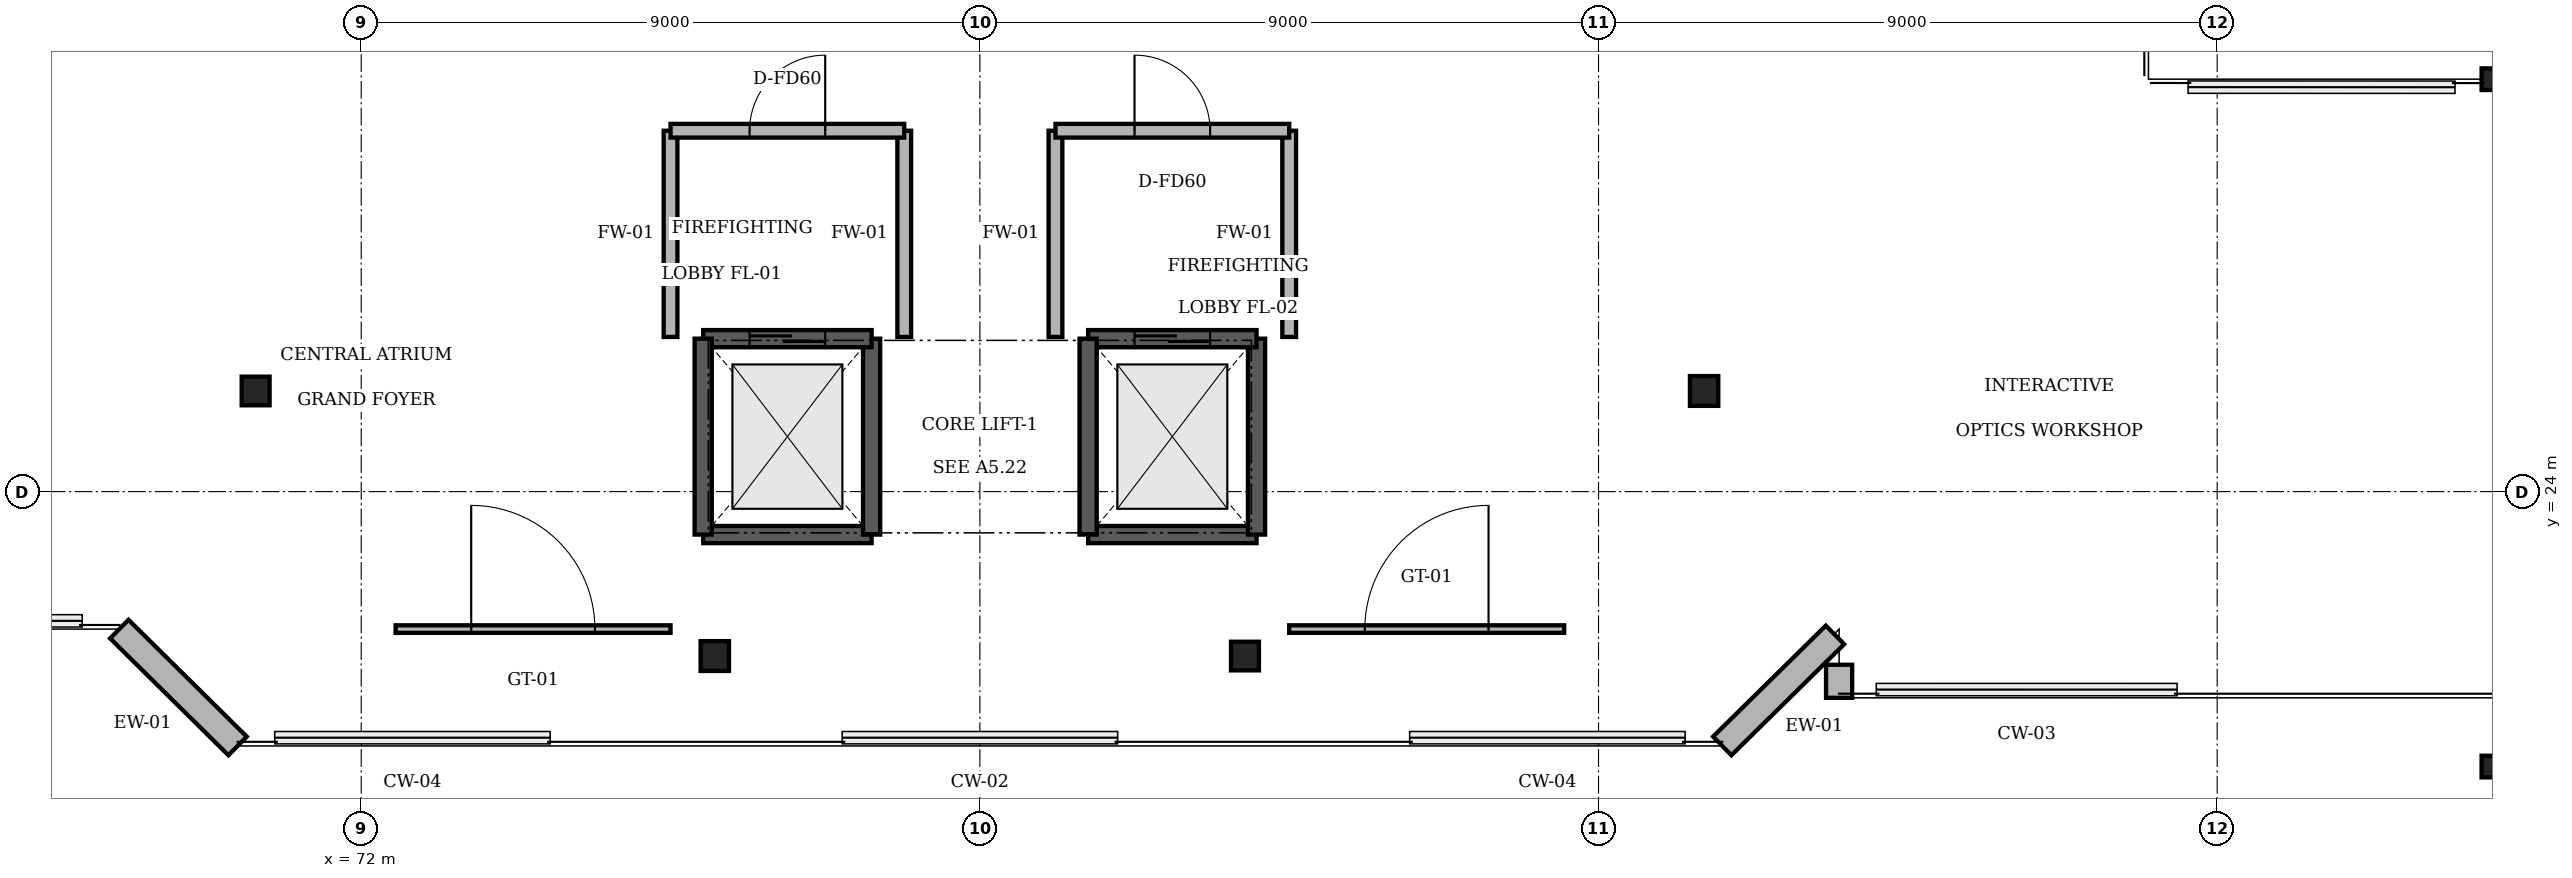
"""IFC4 building model, lengths in metres.
Left out: names, types, materials, properties, quantities, classifications, styles, units other than length and angle.
Written with IfcOpenShell. Run it as: python <this file> out.ifc"""

import sys

from ifc_helpers import new_model, si_unit, direction, frame, frame_2d, origin, origin_2d, place, context, subcontext, project, spatial, rectangle, i_section, extrude, element, fill, save


model = new_model("IFC4")
c1 = context("Model", 3, precision=1e-05, world=origin(), true_north=direction((0.0, 1.0)))
c2 = subcontext(c1, "Body", "Model", "MODEL_VIEW")
j1 = project(units=[si_unit("LENGTHUNIT", "METRE"), si_unit("PLANEANGLEUNIT", "RADIAN")], contexts=[c1])
p1 = place(None, origin())
s1 = spatial("IfcSite", under=j1, at=p1, CompositionType="ELEMENT")
p2 = place(p1, origin())
s2 = spatial("IfcBuilding", under=s1, at=p2, CompositionType="ELEMENT")
p3 = place(p2, origin())
s3 = spatial("IfcBuildingStorey", under=s2, at=p3, CompositionType="ELEMENT", Elevation=0.0)
p4 = place(p3, frame((70.464, 25.464, 0.0), z_axis=(0.0, 0.0, 1.0), x_axis=(1.0, 0.0, 0.0)))
e1 = element("IfcColumn", 1, at=p4, inside=s3, PredefinedType="COLUMN", context=c2, shape_type="SweptSolid", body=[
    extrude(i_section(OverallWidth=0.406, OverallDepth=0.417, WebThickness=0.03, FlangeThickness=0.044, FilletRadius=0.015, at=origin_2d()), origin(), (0.0, 0.0, 1.0), 5.4),
])
p5 = place(p3, frame((77.144, 21.608, 0.0), z_axis=(0.0, 0.0, 1.0), x_axis=(1.0, 0.0, 0.0)))
e2 = element("IfcColumn", 2, at=p5, inside=s3, PredefinedType="COLUMN", context=c2, shape_type="SweptSolid", body=[
    extrude(i_section(OverallWidth=0.412, OverallDepth=0.434, WebThickness=0.036, FlangeThickness=0.044, FilletRadius=0.015, at=origin_2d()), origin(), (0.0, 0.0, 1.0), 5.4),
])
p6 = place(p3, frame((84.856, 21.608, 0.0), z_axis=(0.0, 0.0, 1.0), x_axis=(1.0, 0.0, 0.0)))
e3 = element("IfcColumn", 3, at=p6, inside=s3, PredefinedType="COLUMN", context=c2, shape_type="SweptSolid", body=[
    extrude(i_section(OverallWidth=0.406, OverallDepth=0.417, WebThickness=0.03, FlangeThickness=0.044, FilletRadius=0.015, at=origin_2d()), origin(), (0.0, 0.0, 1.0), 5.4),
])
p7 = place(p3, frame((91.536, 25.464, 0.0), z_axis=(0.0, 0.0, 1.0), x_axis=(1.0, 0.0, 0.0)))
e4 = element("IfcColumn", 4, at=p7, inside=s3, PredefinedType="COLUMN", context=c2, shape_type="SweptSolid", body=[
    extrude(i_section(OverallWidth=0.412, OverallDepth=0.434, WebThickness=0.036, FlangeThickness=0.044, FilletRadius=0.015, at=origin_2d()), origin(), (0.0, 0.0, 1.0), 5.4),
])
for number, where, z_axis, x_axis in (
    (5, (103.0, 20.0, 0.0), (0.0, 0.0, 1.0), (1.0, 0.0, 0.0)),
    (6, (103.0, 30.0, 0.0), (0.0, 0.0, 1.0), (1.0, 0.0, 0.0)),
):
    element("IfcColumn", number, at=place(p3, frame(where, z_axis=z_axis, x_axis=x_axis)), inside=s3, PredefinedType="COLUMN", context=c2, shape_type="SweptSolid", body=[
        extrude(i_section(OverallWidth=0.307, OverallDepth=0.315, WebThickness=0.012, FlangeThickness=0.019, FilletRadius=0.013, at=origin_2d()), origin(), (0.0, 0.0, 1.0), 5.4),
    ])
p8 = place(p3, frame((93.5, 21.0, 0.0), z_axis=(0.0, 0.0, 1.0), x_axis=(0.0, 1.0, 0.0)))
e7 = element("IfcWall", 7, at=p8, inside=s3, PredefinedType="SOLIDWALL", context=c2, shape_type="SweptSolid", body=[
    extrude(rectangle(XDim=0.481, YDim=0.38, at=frame_2d((0.24, 0.0))), origin(), (0.0, 0.0, 1.0), 4.7),
])
p9 = place(p3, frame((93.44, 21.915, 0.0), z_axis=(0.0, 0.0, 1.0), x_axis=(-0.712495836669, -0.701676337586, 0.0)))
e8 = element("IfcWall", 8, at=p9, inside=s3, PredefinedType="SOLIDWALL", context=c2, shape_type="SweptSolid", body=[
    extrude(rectangle(XDim=2.302, YDim=0.38, at=frame_2d((1.151, 0.0))), origin(), (0.0, 0.0, 1.0), 4.7),
])
p10 = place(p3, frame((70.201, 20.3, 0.0), z_axis=(0.0, 0.0, 1.0), x_axis=(-0.711384076748, 0.702803454281, 0.0)))
e9 = element("IfcWall", 9, at=p10, inside=s3, PredefinedType="SOLIDWALL", context=c2, shape_type="SweptSolid", body=[
    extrude(rectangle(XDim=2.418, YDim=0.38, at=frame_2d((1.209, 0.0))), origin(), (0.0, 0.0, 1.0), 4.7),
])
p11 = place(p3, frame((76.975, 23.375, 0.0), z_axis=(0.0, 0.0, 1.0), x_axis=(1.0, 0.0, 0.0)))
e10 = element("IfcWall", 10, at=p11, inside=s3, PredefinedType="SOLIDWALL", context=c2, shape_type="SweptSolid", body=[
    extrude(rectangle(XDim=2.45, YDim=0.25, at=frame_2d((1.225, 0.0))), origin(), (0.0, 0.0, 1.0), 5.4),
])
p12 = place(p3, frame((79.425, 23.375, 0.0), z_axis=(0.0, 0.0, 1.0), x_axis=(0.0, 1.0, 0.0)))
e11 = element("IfcWall", 11, at=p12, inside=s3, PredefinedType="SOLIDWALL", context=c2, shape_type="SweptSolid", body=[
    extrude(rectangle(XDim=2.85, YDim=0.25, at=frame_2d((1.425, 0.0))), origin(), (0.0, 0.0, 1.0), 5.4),
])
p13 = place(p3, frame((79.425, 26.225, 0.0), z_axis=(0.0, 0.0, 1.0), x_axis=(-1.0, 0.0, 0.0)))
e12 = element("IfcWall", 12, at=p13, inside=s3, PredefinedType="SOLIDWALL", context=c2, shape_type="SweptSolid", body=[
    extrude(rectangle(XDim=2.45, YDim=0.25, at=frame_2d((1.225, 0.0))), origin(), (0.0, 0.0, 1.0), 5.4),
])
p14 = place(p13, frame((0.675, 0.0, 0.0)))
e13 = element("IfcOpeningElement", 13, at=p14, cuts=e12, PredefinedType="OPENING", context=c2, shape_type="SweptSolid", body=[
    extrude(rectangle(XDim=1.1, YDim=2.2, at=frame_2d((0.55, 1.1))), frame((0.0, 0.135, 0.0), z_axis=(0.0, -1.0, 0.0), x_axis=(1.0, 0.0, 0.0)), (0.0, 0.0, 1.0), 0.27),
])
p15 = place(p3, frame((76.975, 26.225, 0.0), z_axis=(0.0, 0.0, 1.0), x_axis=(0.0, -1.0, 0.0)))
e14 = element("IfcWall", 14, at=p15, inside=s3, PredefinedType="SOLIDWALL", context=c2, shape_type="SweptSolid", body=[
    extrude(rectangle(XDim=2.85, YDim=0.25, at=frame_2d((1.425, 0.0))), origin(), (0.0, 0.0, 1.0), 5.4),
])
p16 = place(p3, frame((76.5, 26.25, 0.0), z_axis=(0.0, 0.0, 1.0), x_axis=(0.0, 1.0, 0.0)))
e15 = element("IfcWall", 15, at=p16, inside=s3, PredefinedType="SOLIDWALL", context=c2, shape_type="SweptSolid", body=[
    extrude(rectangle(XDim=3.0, YDim=0.2, at=frame_2d((1.5, 0.0))), origin(), (0.0, 0.0, 1.0), 4.204),
])
p17 = place(p3, frame((79.9, 26.25, 0.0), z_axis=(0.0, 0.0, 1.0), x_axis=(0.0, 1.0, 0.0)))
e16 = element("IfcWall", 16, at=p17, inside=s3, PredefinedType="SOLIDWALL", context=c2, shape_type="SweptSolid", body=[
    extrude(rectangle(XDim=3.0, YDim=0.2, at=frame_2d((1.5, 0.0))), origin(), (0.0, 0.0, 1.0), 4.57),
])
p18 = place(p3, frame((76.5, 29.25, 0.0), z_axis=(0.0, 0.0, 1.0), x_axis=(1.0, 0.0, 0.0)))
e17 = element("IfcWall", 17, at=p18, inside=s3, PredefinedType="SOLIDWALL", context=c2, shape_type="SweptSolid", body=[
    extrude(rectangle(XDim=3.4, YDim=0.2, at=frame_2d((1.7, 0.0))), origin(), (0.0, 0.0, 1.0), 4.204),
])
p19 = place(p18, frame((1.15, 0.0, 0.0)))
e18 = element("IfcOpeningElement", 18, at=p19, cuts=e17, PredefinedType="OPENING", context=c2, shape_type="SweptSolid", body=[
    extrude(rectangle(XDim=1.1, YDim=2.2, at=frame_2d((0.55, 1.1))), frame((0.0, 0.11, 0.0), z_axis=(0.0, -1.0, 0.0), x_axis=(1.0, 0.0, 0.0)), (0.0, 0.0, 1.0), 0.22),
])
p20 = place(p3, frame((82.575, 23.375, 0.0), z_axis=(0.0, 0.0, 1.0), x_axis=(1.0, 0.0, 0.0)))
e19 = element("IfcWall", 19, at=p20, inside=s3, PredefinedType="SOLIDWALL", context=c2, shape_type="SweptSolid", body=[
    extrude(rectangle(XDim=2.45, YDim=0.25, at=frame_2d((1.225, 0.0))), origin(), (0.0, 0.0, 1.0), 5.4),
])
p21 = place(p3, frame((85.025, 23.375, 0.0), z_axis=(0.0, 0.0, 1.0), x_axis=(0.0, 1.0, 0.0)))
e20 = element("IfcWall", 20, at=p21, inside=s3, PredefinedType="SOLIDWALL", context=c2, shape_type="SweptSolid", body=[
    extrude(rectangle(XDim=2.85, YDim=0.25, at=frame_2d((1.425, 0.0))), origin(), (0.0, 0.0, 1.0), 5.4),
])
p22 = place(p3, frame((85.025, 26.225, 0.0), z_axis=(0.0, 0.0, 1.0), x_axis=(-1.0, 0.0, 0.0)))
e21 = element("IfcWall", 21, at=p22, inside=s3, PredefinedType="SOLIDWALL", context=c2, shape_type="SweptSolid", body=[
    extrude(rectangle(XDim=2.45, YDim=0.25, at=frame_2d((1.225, 0.0))), origin(), (0.0, 0.0, 1.0), 5.4),
])
p23 = place(p22, frame((0.675, 0.0, 0.0)))
e22 = element("IfcOpeningElement", 22, at=p23, cuts=e21, PredefinedType="OPENING", context=c2, shape_type="SweptSolid", body=[
    extrude(rectangle(XDim=1.1, YDim=2.2, at=frame_2d((0.55, 1.1))), frame((0.0, 0.135, 0.0), z_axis=(0.0, -1.0, 0.0), x_axis=(1.0, 0.0, 0.0)), (0.0, 0.0, 1.0), 0.27),
])
p24 = place(p3, frame((82.575, 26.225, 0.0), z_axis=(0.0, 0.0, 1.0), x_axis=(0.0, -1.0, 0.0)))
e23 = element("IfcWall", 23, at=p24, inside=s3, PredefinedType="SOLIDWALL", context=c2, shape_type="SweptSolid", body=[
    extrude(rectangle(XDim=2.85, YDim=0.25, at=frame_2d((1.425, 0.0))), origin(), (0.0, 0.0, 1.0), 5.4),
])
p25 = place(p3, frame((82.1, 26.25, 0.0), z_axis=(0.0, 0.0, 1.0), x_axis=(0.0, 1.0, 0.0)))
e24 = element("IfcWall", 24, at=p25, inside=s3, PredefinedType="SOLIDWALL", context=c2, shape_type="SweptSolid", body=[
    extrude(rectangle(XDim=3.0, YDim=0.2, at=frame_2d((1.5, 0.0))), origin(), (0.0, 0.0, 1.0), 4.57),
])
p26 = place(p3, frame((85.5, 26.25, 0.0), z_axis=(0.0, 0.0, 1.0), x_axis=(0.0, 1.0, 0.0)))
e25 = element("IfcWall", 25, at=p26, inside=s3, PredefinedType="SOLIDWALL", context=c2, shape_type="SweptSolid", body=[
    extrude(rectangle(XDim=3.0, YDim=0.2, at=frame_2d((1.5, 0.0))), origin(), (0.0, 0.0, 1.0), 4.206),
])
p27 = place(p3, frame((82.1, 29.25, 0.0), z_axis=(0.0, 0.0, 1.0), x_axis=(1.0, 0.0, 0.0)))
e26 = element("IfcWall", 26, at=p27, inside=s3, PredefinedType="SOLIDWALL", context=c2, shape_type="SweptSolid", body=[
    extrude(rectangle(XDim=3.4, YDim=0.2, at=frame_2d((1.7, 0.0))), origin(), (0.0, 0.0, 1.0), 4.206),
])
p28 = place(p27, frame((1.15, 0.0, 0.0)))
e27 = element("IfcOpeningElement", 27, at=p28, cuts=e26, PredefinedType="OPENING", context=c2, shape_type="SweptSolid", body=[
    extrude(rectangle(XDim=1.1, YDim=2.2, at=frame_2d((0.55, 1.1))), frame((0.0, 0.11, 0.0), z_axis=(0.0, -1.0, 0.0), x_axis=(1.0, 0.0, 0.0)), (0.0, 0.0, 1.0), 0.22),
])
p29 = place(p3, frame((72.5, 22.0, 0.0), z_axis=(0.0, 0.0, 1.0), x_axis=(1.0, 0.0, 0.0)))
e28 = element("IfcWall", 28, at=p29, inside=s3, PredefinedType="PARTITIONING", context=c2, shape_type="SweptSolid", body=[
    extrude(rectangle(XDim=4.0, YDim=0.11, at=frame_2d((2.0, 0.0))), origin(), (0.0, 0.0, 1.0), 2.55),
])
p30 = place(p29, frame((1.1, 0.0, 0.0)))
e29 = element("IfcOpeningElement", 29, at=p30, cuts=e28, PredefinedType="OPENING", context=c2, shape_type="SweptSolid", body=[
    extrude(rectangle(XDim=1.8, YDim=2.1, at=frame_2d((0.9, 1.05))), frame((0.0, 0.065, 0.0), z_axis=(0.0, -1.0, 0.0), x_axis=(1.0, 0.0, 0.0)), (0.0, 0.0, 1.0), 0.13),
])
p31 = place(p3, frame((85.5, 22.0, 0.0), z_axis=(0.0, 0.0, 1.0), x_axis=(1.0, 0.0, 0.0)))
e30 = element("IfcWall", 30, at=p31, inside=s3, PredefinedType="PARTITIONING", context=c2, shape_type="SweptSolid", body=[
    extrude(rectangle(XDim=4.0, YDim=0.11, at=frame_2d((2.0, 0.0))), origin(), (0.0, 0.0, 1.0), 2.55),
])
p32 = place(p31, frame((1.1, 0.0, 0.0)))
e31 = element("IfcOpeningElement", 31, at=p32, cuts=e30, PredefinedType="OPENING", context=c2, shape_type="SweptSolid", body=[
    extrude(rectangle(XDim=1.8, YDim=2.1, at=frame_2d((0.9, 1.05))), frame((0.0, 0.065, 0.0), z_axis=(0.0, -1.0, 0.0), x_axis=(1.0, 0.0, 0.0)), (0.0, 0.0, 1.0), 0.13),
])
p33 = place(p14, origin())
e32 = element("IfcDoor", 32, at=p33, inside=s3, OperationType="SLIDING_TO_LEFT", PredefinedType="DOOR", context=c2, shape_type="SweptSolid", body=[
    extrude(rectangle(XDim=1.1, YDim=2.2, at=frame_2d((0.55, 1.1))), frame((0.0, 0.025, 0.0), z_axis=(0.0, -1.0, 0.0), x_axis=(1.0, 0.0, 0.0)), (0.0, 0.0, 1.0), 0.05),
])
fill(e13, e32)
p34 = place(p19, origin())
e33 = element("IfcDoor", 33, at=p34, inside=s3, OperationType="SINGLE_SWING_RIGHT", PredefinedType="DOOR", context=c2, shape_type="SweptSolid", body=[
    extrude(rectangle(XDim=1.1, YDim=2.2, at=frame_2d((0.55, 1.1))), frame((0.0, 0.025, 0.0), z_axis=(0.0, -1.0, 0.0), x_axis=(1.0, 0.0, 0.0)), (0.0, 0.0, 1.0), 0.05),
])
fill(e18, e33)
p35 = place(p23, origin())
e34 = element("IfcDoor", 34, at=p35, inside=s3, OperationType="SLIDING_TO_LEFT", PredefinedType="DOOR", context=c2, shape_type="SweptSolid", body=[
    extrude(rectangle(XDim=1.1, YDim=2.2, at=frame_2d((0.55, 1.1))), frame((0.0, 0.025, 0.0), z_axis=(0.0, -1.0, 0.0), x_axis=(1.0, 0.0, 0.0)), (0.0, 0.0, 1.0), 0.05),
])
fill(e22, e34)
p36 = place(p28, origin())
e35 = element("IfcDoor", 35, at=p36, inside=s3, OperationType="SINGLE_SWING_LEFT", PredefinedType="DOOR", context=c2, shape_type="SweptSolid", body=[
    extrude(rectangle(XDim=1.1, YDim=2.2, at=frame_2d((0.55, 1.1))), frame((0.0, 0.025, 0.0), z_axis=(0.0, -1.0, 0.0), x_axis=(1.0, 0.0, 0.0)), (0.0, 0.0, 1.0), 0.05),
])
fill(e27, e35)
p37 = place(p30, origin())
e36 = element("IfcDoor", 36, at=p37, inside=s3, OperationType="SINGLE_SWING_LEFT", PredefinedType="GATE", context=c2, shape_type="SweptSolid", body=[
    extrude(rectangle(XDim=1.8, YDim=2.1, at=frame_2d((0.9, 1.05))), frame((0.0, 0.025, 0.0), z_axis=(0.0, -1.0, 0.0), x_axis=(1.0, 0.0, 0.0)), (0.0, 0.0, 1.0), 0.05),
])
fill(e29, e36)
p38 = place(p32, origin())
e37 = element("IfcDoor", 37, at=p38, inside=s3, OperationType="SINGLE_SWING_RIGHT", PredefinedType="GATE", context=c2, shape_type="SweptSolid", body=[
    extrude(rectangle(XDim=1.8, YDim=2.1, at=frame_2d((0.9, 1.05))), frame((0.0, 0.025, 0.0), z_axis=(0.0, -1.0, 0.0), x_axis=(1.0, 0.0, 0.0)), (0.0, 0.0, 1.0), 0.05),
])
fill(e31, e37)
save(model, sys.argv[1])
